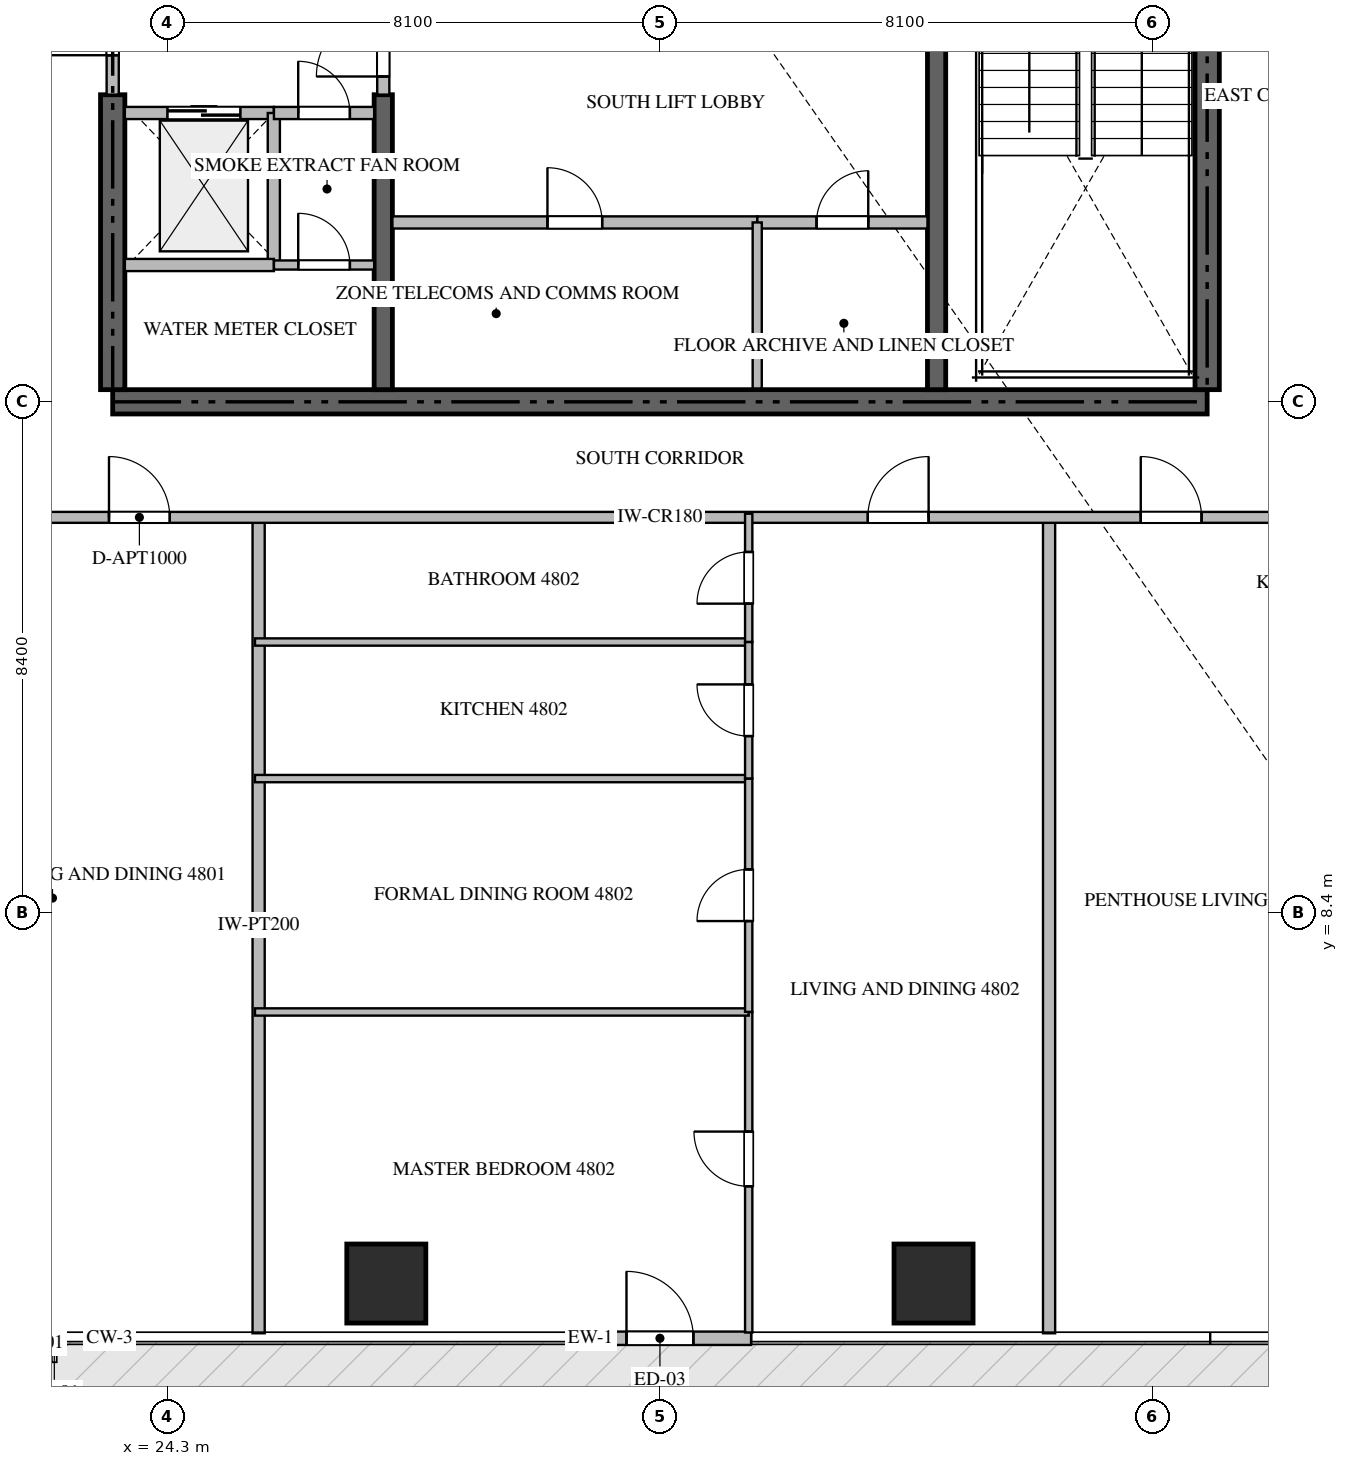
"""IFC4 building model, lengths in metres.
Left out: names, types, materials, properties, quantities, classifications, styles, units other than length and angle.
Written with IfcOpenShell. Run it as: python <this file> out.ifc"""

import sys

from ifc_helpers import new_model, si_unit, direction, frame, frame_2d, origin, origin_2d, place, context, subcontext, project, spatial, rectangle, extrude, source, transform, mapped, element, fill, save


model = new_model("IFC4")
c1 = context("Model", 3, precision=1e-05, world=origin(), true_north=direction((0.0, 1.0)))
c2 = subcontext(c1, "Body", "Model", "MODEL_VIEW")
j1 = project(units=[si_unit("LENGTHUNIT", "METRE"), si_unit("PLANEANGLEUNIT", "RADIAN")], contexts=[c1])
p1 = place(None, origin())
s1 = spatial("IfcSite", under=j1, at=p1, CompositionType="ELEMENT")
p2 = place(p1, origin())
s2 = spatial("IfcBuilding", under=s1, at=p2, CompositionType="ELEMENT")
p3 = place(p2, frame((0.0, 0.0, 191.4)))
s3 = spatial("IfcBuildingStorey", under=s2, at=p3, CompositionType="ELEMENT", Elevation=191.4)
p4 = place(p3, frame((23.4, 16.8, -0.26), z_axis=(0.0, 0.0, 1.0), x_axis=(1.0, 0.0, 0.0)))
e1 = element("IfcWall", 1, at=p4, inside=s3, PredefinedType="SHEAR", context=c2, shape_type="SweptSolid", body=[
    extrude(rectangle(XDim=18.0, YDim=0.4, at=frame_2d((9.0, 0.0))), origin(), (0.0, 0.0, 1.0), 3.748),
])
p5 = place(p3, frame((23.4, 17.0, -0.26), z_axis=(0.0, 0.0, 1.0), x_axis=(0.0, 1.0, 0.0)))
e2 = element("IfcWall", 2, at=p5, inside=s3, PredefinedType="SHEAR", context=c2, shape_type="SweptSolid", body=[
    extrude(rectangle(XDim=4.85, YDim=0.4, at=frame_2d((2.425, 0.0))), origin(), (0.0, 0.0, 1.0), 3.748),
])
p6 = place(p3, frame((41.4, 17.0, -0.26), z_axis=(0.0, 0.0, 1.0), x_axis=(0.0, 1.0, 0.0)))
e3 = element("IfcWall", 3, at=p6, inside=s3, PredefinedType="SHEAR", context=c2, shape_type="SweptSolid", body=[
    extrude(rectangle(XDim=8.35, YDim=0.4, at=frame_2d((4.175, 0.0))), origin(), (0.0, 0.0, 1.0), 3.748),
])
p7 = place(p3, frame((27.85, 17.0, -0.26), z_axis=(0.0, 0.0, 1.0), x_axis=(0.0, 1.0, 0.0)))
e4 = element("IfcWall", 4, at=p7, inside=s3, PredefinedType="SHEAR", context=c2, shape_type="SweptSolid", body=[
    extrude(rectangle(XDim=4.85, YDim=0.3, at=frame_2d((2.425, 0.0))), origin(), (0.0, 0.0, 1.0), 3.748),
])
p8 = place(p3, frame((36.95, 17.0, -0.26), z_axis=(0.0, 0.0, 1.0), x_axis=(0.0, 1.0, 0.0)))
e5 = element("IfcWall", 5, at=p8, inside=s3, PredefinedType="SHEAR", context=c2, shape_type="SweptSolid", body=[
    extrude(rectangle(XDim=8.35, YDim=0.3, at=frame_2d((4.175, 0.0))), origin(), (0.0, 0.0, 1.0), 3.748),
])
m1 = source(origin(), c2, "Body", "SweptSolid", [
    extrude(rectangle(XDim=1.3, YDim=1.3, at=origin_2d()), origin(), (0.0, 0.0, 1.0), 3.75),
])
for number, where, z_axis, x_axis in (
    (6, (27.9, 2.3, -0.26), (0.0, 0.0, 1.0), (1.0, 0.0, 0.0)),
    (7, (36.9, 2.3, -0.26), (0.0, 0.0, 1.0), (1.0, 0.0, 0.0)),
):
    element("IfcColumn", number, at=place(p3, frame(where, z_axis=z_axis, x_axis=x_axis)), inside=s3, PredefinedType="COLUMN", context=c2, shape_type="MappedRepresentation", body=[
        mapped(m1, transform((0.0, 0.0, 0.0), scale=1.0)),
    ])
p9 = place(p3, frame((30.9, 1.4, 0.0), z_axis=(0.0, 0.0, 1.0), x_axis=(1.0, 0.0, 0.0)))
e8 = element("IfcWall", 8, at=p9, inside=s3, PredefinedType="ELEMENTEDWALL", context=c2, shape_type="SweptSolid", body=[
    extrude(rectangle(XDim=3.0, YDim=0.22, at=frame_2d((1.5, 0.0))), origin(), (0.0, 0.0, 1.0), 3.475),
])
p10 = place(p9, frame((0.95, 0.0, 0.0)))
e9 = element("IfcOpeningElement", 9, at=p10, cuts=e8, PredefinedType="OPENING", context=c2, shape_type="SweptSolid", body=[
    extrude(rectangle(XDim=1.1, YDim=2.2, at=frame_2d((0.55, 1.1))), frame((0.0, 0.12, 0.0), z_axis=(0.0, -1.0, 0.0), x_axis=(1.0, 0.0, 0.0)), (0.0, 0.0, 1.0), 0.24),
])
p11 = place(p3, frame((23.6, 21.55, 0.0), z_axis=(0.0, 0.0, 1.0), x_axis=(1.0, 0.0, 0.0)))
e10 = element("IfcWall", 10, at=p11, inside=s3, PredefinedType="STANDARD", context=c2, shape_type="SweptSolid", body=[
    extrude(rectangle(XDim=2.45, YDim=0.2, at=frame_2d((1.225, 0.0))), origin(), (0.0, 0.0, 1.0), 3.49),
])
p12 = place(p11, frame((0.7, 0.0, 0.0)))
e11 = element("IfcOpeningElement", 11, at=p12, cuts=e10, PredefinedType="OPENING", context=c2, shape_type="SweptSolid", body=[
    extrude(rectangle(XDim=1.2, YDim=2.2, at=frame_2d((0.6, 1.1))), frame((0.0, 0.11, 0.0), z_axis=(0.0, -1.0, 0.0), x_axis=(1.0, 0.0, 0.0)), (0.0, 0.0, 1.0), 0.22),
])
p13 = place(p3, frame((26.05, 19.05, 0.0), z_axis=(0.0, 0.0, 1.0), x_axis=(0.0, 1.0, 0.0)))
e12 = element("IfcWall", 12, at=p13, inside=s3, PredefinedType="STANDARD", context=c2, shape_type="SweptSolid", body=[
    extrude(rectangle(XDim=2.5, YDim=0.2, at=frame_2d((1.25, 0.0))), origin(), (0.0, 0.0, 1.0), 3.49),
])
p14 = place(p3, frame((23.6, 19.05, 0.0), z_axis=(0.0, 0.0, 1.0), x_axis=(1.0, 0.0, 0.0)))
e13 = element("IfcWall", 13, at=p14, inside=s3, PredefinedType="STANDARD", context=c2, shape_type="SweptSolid", body=[
    extrude(rectangle(XDim=2.45, YDim=0.2, at=frame_2d((1.225, 0.0))), origin(), (0.0, 0.0, 1.0), 3.49),
])
p15 = place(p3, frame((26.052, 21.55, 0.0), z_axis=(0.0, 0.0, 1.0), x_axis=(1.0, 0.0, 0.0)))
e14 = element("IfcWall", 14, at=p15, inside=s3, PredefinedType="STANDARD", context=c2, shape_type="SweptSolid", body=[
    extrude(rectangle(XDim=1.648, YDim=0.2, at=frame_2d((0.824, 0.0))), origin(), (0.0, 0.0, 1.0), 3.49),
])
p16 = place(p15, frame((0.399, 0.0, 0.0)))
e15 = element("IfcOpeningElement", 15, at=p16, cuts=e14, PredefinedType="OPENING", context=c2, shape_type="SweptSolid", body=[
    extrude(rectangle(XDim=0.85, YDim=2.1, at=frame_2d((0.425, 1.05))), frame((0.0, 0.11, 0.0), z_axis=(0.0, -1.0, 0.0), x_axis=(1.0, 0.0, 0.0)), (0.0, 0.0, 1.0), 0.22),
])
p17 = place(p3, frame((23.4, 21.852, 0.0), z_axis=(0.0, 0.0, 1.0), x_axis=(0.0, 1.0, 0.0)))
e16 = element("IfcWall", 16, at=p17, inside=s3, PredefinedType="STANDARD", context=c2, shape_type="SweptSolid", body=[
    extrude(rectangle(XDim=2.396, YDim=0.2, at=frame_2d((1.198, 0.0))), origin(), (0.0, 0.0, 1.0), 3.49),
])
p18 = place(p17, frame((0.648, 0.0, 0.0)))
e17 = element("IfcOpeningElement", 17, at=p18, cuts=e16, PredefinedType="OPENING", context=c2, shape_type="SweptSolid", body=[
    extrude(rectangle(XDim=1.1, YDim=2.15, at=frame_2d((0.55, 1.075))), frame((0.0, 0.11, 0.0), z_axis=(0.0, -1.0, 0.0), x_axis=(1.0, 0.0, 0.0)), (0.0, 0.0, 1.0), 0.22),
])
p19 = place(p3, frame((27.85, 21.852, 0.0), z_axis=(0.0, 0.0, 1.0), x_axis=(0.0, 1.0, 0.0)))
e18 = element("IfcWall", 18, at=p19, inside=s3, PredefinedType="STANDARD", context=c2, shape_type="SweptSolid", body=[
    extrude(rectangle(XDim=1.696, YDim=0.2, at=frame_2d((0.848, 0.0))), origin(), (0.0, 0.0, 1.0), 3.49),
])
p20 = place(p19, frame((0.298, 0.0, 0.0)))
e19 = element("IfcOpeningElement", 19, at=p20, cuts=e18, PredefinedType="OPENING", context=c2, shape_type="SweptSolid", body=[
    extrude(rectangle(XDim=1.1, YDim=2.15, at=frame_2d((0.55, 1.075))), frame((0.0, 0.11, 0.0), z_axis=(0.0, -1.0, 0.0), x_axis=(1.0, 0.0, 0.0)), (0.0, 0.0, 1.0), 0.22),
])
p21 = place(p3, frame((26.052, 19.05, 0.0), z_axis=(0.0, 0.0, 1.0), x_axis=(1.0, 0.0, 0.0)))
e20 = element("IfcWall", 20, at=p21, inside=s3, PredefinedType="PARTITIONING", context=c2, shape_type="SweptSolid", body=[
    extrude(rectangle(XDim=1.648, YDim=0.15, at=frame_2d((0.824, 0.0))), origin(), (0.0, 0.0, 1.0), 3.49),
])
p22 = place(p21, frame((0.399, 0.0, 0.0)))
e21 = element("IfcOpeningElement", 21, at=p22, cuts=e20, PredefinedType="OPENING", context=c2, shape_type="SweptSolid", body=[
    extrude(rectangle(XDim=0.85, YDim=2.1, at=frame_2d((0.425, 1.05))), frame((0.0, 0.085, 0.0), z_axis=(0.0, -1.0, 0.0), x_axis=(1.0, 0.0, 0.0)), (0.0, 0.0, 1.0), 0.17),
])
p23 = place(p3, frame((28.0, 19.75, 0.0), z_axis=(0.0, 0.0, 1.0), x_axis=(1.0, 0.0, 0.0)))
e22 = element("IfcWall", 22, at=p23, inside=s3, PredefinedType="STANDARD", context=c2, shape_type="SweptSolid", body=[
    extrude(rectangle(XDim=6.0, YDim=0.2, at=frame_2d((3.0, 0.0))), origin(), (0.0, 0.0, 1.0), 3.49),
])
p24 = place(p23, frame((2.55, 0.0, 0.0)))
e23 = element("IfcOpeningElement", 23, at=p24, cuts=e22, PredefinedType="OPENING", context=c2, shape_type="SweptSolid", body=[
    extrude(rectangle(XDim=0.9, YDim=2.1, at=frame_2d((0.45, 1.05))), frame((0.0, 0.11, 0.0), z_axis=(0.0, -1.0, 0.0), x_axis=(1.0, 0.0, 0.0)), (0.0, 0.0, 1.0), 0.22),
])
p25 = place(p3, frame((34.002, 19.75, 0.0), z_axis=(0.0, 0.0, 1.0), x_axis=(1.0, 0.0, 0.0)))
e24 = element("IfcWall", 24, at=p25, inside=s3, PredefinedType="STANDARD", context=c2, shape_type="SweptSolid", body=[
    extrude(rectangle(XDim=2.798, YDim=0.2, at=frame_2d((1.399, 0.0))), origin(), (0.0, 0.0, 1.0), 3.49),
])
p26 = place(p25, frame((0.974, 0.0, 0.0)))
e25 = element("IfcOpeningElement", 25, at=p26, cuts=e24, PredefinedType="OPENING", context=c2, shape_type="SweptSolid", body=[
    extrude(rectangle(XDim=0.85, YDim=2.1, at=frame_2d((0.425, 1.05))), frame((0.0, 0.11, 0.0), z_axis=(0.0, -1.0, 0.0), x_axis=(1.0, 0.0, 0.0)), (0.0, 0.0, 1.0), 0.22),
])
p27 = place(p3, frame((34.0, 17.02, 0.0), z_axis=(0.0, 0.0, 1.0), x_axis=(0.0, 1.0, 0.0)))
e26 = element("IfcWall", 26, at=p27, inside=s3, PredefinedType="PARTITIONING", context=c2, shape_type="SweptSolid", body=[
    extrude(rectangle(XDim=2.73, YDim=0.15, at=frame_2d((1.365, 0.0))), origin(), (0.0, 0.0, 1.0), 3.49),
])
for number, where, z_axis, x_axis in (
    (27, (25.8, 1.482, 0.0), (0.0, 0.0, 1.0), (0.0, 1.0, 0.0)),
    (28, (38.8, 1.482, 0.0), (0.0, 0.0, 1.0), (0.0, 1.0, 0.0)),
):
    element("IfcWall", number, at=place(p3, frame(where, z_axis=z_axis, x_axis=x_axis)), inside=s3, PredefinedType="PARTITIONING", context=c2, shape_type="SweptSolid", body=[
        extrude(rectangle(XDim=13.418, YDim=0.2, at=frame_2d((6.709, 0.0))), origin(), (0.0, 0.0, 1.0), 3.49),
    ])
p28 = place(p3, frame((20.952, 14.9, 0.0), z_axis=(0.0, 0.0, 1.0), x_axis=(1.0, 0.0, 0.0)))
e29 = element("IfcWall", 29, at=p28, inside=s3, PredefinedType="PARTITIONING", context=c2, shape_type="SweptSolid", body=[
    extrude(rectangle(XDim=22.896, YDim=0.18, at=frame_2d((11.448, 0.0))), origin(), (0.0, 0.0, 1.0), 3.49),
])
p29 = place(p28, frame((2.387, 0.0, 0.0)))
e30 = element("IfcOpeningElement", 30, at=p29, cuts=e29, PredefinedType="OPENING", context=c2, shape_type="SweptSolid", body=[
    extrude(rectangle(XDim=1.0, YDim=2.15, at=frame_2d((0.5, 1.075))), frame((0.0, 0.1, 0.0), z_axis=(0.0, -1.0, 0.0), x_axis=(1.0, 0.0, 0.0)), (0.0, 0.0, 1.0), 0.2),
])
p30 = place(p28, frame((14.867, 0.0, 0.0)))
e31 = element("IfcOpeningElement", 31, at=p30, cuts=e29, PredefinedType="OPENING", context=c2, shape_type="SweptSolid", body=[
    extrude(rectangle(XDim=1.0, YDim=2.15, at=frame_2d((0.5, 1.075))), frame((0.0, 0.1, 0.0), z_axis=(0.0, -1.0, 0.0), x_axis=(1.0, 0.0, 0.0)), (0.0, 0.0, 1.0), 0.2),
])
p31 = place(p28, frame((19.356, 0.0, 0.0)))
e32 = element("IfcOpeningElement", 32, at=p31, cuts=e29, PredefinedType="OPENING", context=c2, shape_type="SweptSolid", body=[
    extrude(rectangle(XDim=1.0, YDim=2.15, at=frame_2d((0.5, 1.075))), frame((0.0, 0.1, 0.0), z_axis=(0.0, -1.0, 0.0), x_axis=(1.0, 0.0, 0.0)), (0.0, 0.0, 1.0), 0.2),
])
p32 = place(p3, frame((33.86, 1.495, 0.0), z_axis=(0.0, 0.0, 1.0), x_axis=(0.0, 1.0, 0.0)))
e33 = element("IfcWall", 33, at=p32, inside=s3, PredefinedType="PARTITIONING", context=c2, shape_type="SweptSolid", body=[
    extrude(rectangle(XDim=5.271, YDim=0.12, at=frame_2d((2.635, 0.0))), origin(), (0.0, 0.0, 1.0), 3.49),
])
p33 = place(p32, frame((2.404, 0.0, 0.0)))
e34 = element("IfcOpeningElement", 34, at=p33, cuts=e33, PredefinedType="OPENING", context=c2, shape_type="SweptSolid", body=[
    extrude(rectangle(XDim=0.9, YDim=2.1, at=frame_2d((0.45, 1.05))), frame((0.0, 0.07, 0.0), z_axis=(0.0, -1.0, 0.0), x_axis=(1.0, 0.0, 0.0)), (0.0, 0.0, 1.0), 0.14),
])
for number, where, z_axis, x_axis in (
    (35, (25.74, 6.766, 0.0), (0.0, 0.0, 1.0), (1.0, 0.0, 0.0)),
    (36, (25.74, 10.604, 0.0), (0.0, 0.0, 1.0), (1.0, 0.0, 0.0)),
    (37, (25.74, 12.85, 0.0), (0.0, 0.0, 1.0), (1.0, 0.0, 0.0)),
):
    element("IfcWall", number, at=place(p3, frame(where, z_axis=z_axis, x_axis=x_axis)), inside=s3, PredefinedType="PARTITIONING", context=c2, shape_type="SweptSolid", body=[
        extrude(rectangle(XDim=8.12, YDim=0.12, at=frame_2d((4.06, 0.0))), origin(), (0.0, 0.0, 1.0), 3.49),
    ])
p34 = place(p3, frame((33.86, 6.768, 0.0), z_axis=(0.0, 0.0, 1.0), x_axis=(0.0, 1.0, 0.0)))
e38 = element("IfcWall", 38, at=p34, inside=s3, PredefinedType="PARTITIONING", context=c2, shape_type="SweptSolid", body=[
    extrude(rectangle(XDim=3.836, YDim=0.12, at=frame_2d((1.918, 0.0))), origin(), (0.0, 0.0, 1.0), 3.49),
])
p35 = place(p34, frame((1.493, 0.0, 0.0)))
e39 = element("IfcOpeningElement", 39, at=p35, cuts=e38, PredefinedType="OPENING", context=c2, shape_type="SweptSolid", body=[
    extrude(rectangle(XDim=0.85, YDim=2.1, at=frame_2d((0.425, 1.05))), frame((0.0, 0.07, 0.0), z_axis=(0.0, -1.0, 0.0), x_axis=(1.0, 0.0, 0.0)), (0.0, 0.0, 1.0), 0.14),
])
p36 = place(p3, frame((33.86, 10.606, 0.0), z_axis=(0.0, 0.0, 1.0), x_axis=(0.0, 1.0, 0.0)))
e40 = element("IfcWall", 40, at=p36, inside=s3, PredefinedType="PARTITIONING", context=c2, shape_type="SweptSolid", body=[
    extrude(rectangle(XDim=2.244, YDim=0.12, at=frame_2d((1.122, 0.0))), origin(), (0.0, 0.0, 1.0), 3.49),
])
p37 = place(p36, frame((0.697, 0.0, 0.0)))
e41 = element("IfcOpeningElement", 41, at=p37, cuts=e40, PredefinedType="OPENING", context=c2, shape_type="SweptSolid", body=[
    extrude(rectangle(XDim=0.85, YDim=2.1, at=frame_2d((0.425, 1.05))), frame((0.0, 0.07, 0.0), z_axis=(0.0, -1.0, 0.0), x_axis=(1.0, 0.0, 0.0)), (0.0, 0.0, 1.0), 0.14),
])
p38 = place(p3, frame((33.86, 12.852, 0.0), z_axis=(0.0, 0.0, 1.0), x_axis=(0.0, 1.0, 0.0)))
e42 = element("IfcWall", 42, at=p38, inside=s3, PredefinedType="PARTITIONING", context=c2, shape_type="SweptSolid", body=[
    extrude(rectangle(XDim=2.108, YDim=0.12, at=frame_2d((1.054, 0.0))), origin(), (0.0, 0.0, 1.0), 3.49),
])
p39 = place(p38, frame((0.629, 0.0, 0.0)))
e43 = element("IfcOpeningElement", 43, at=p39, cuts=e42, PredefinedType="OPENING", context=c2, shape_type="SweptSolid", body=[
    extrude(rectangle(XDim=0.85, YDim=2.1, at=frame_2d((0.425, 1.05))), frame((0.0, 0.07, 0.0), z_axis=(0.0, -1.0, 0.0), x_axis=(1.0, 0.0, 0.0)), (0.0, 0.0, 1.0), 0.14),
])
m2 = source(origin(), c2, "Body", "SweptSolid", [
    extrude(rectangle(XDim=1.1, YDim=2.2, at=frame_2d((0.55, 1.1))), frame((0.0, 0.025, 0.0), z_axis=(0.0, -1.0, 0.0), x_axis=(1.0, 0.0, 0.0)), (0.0, 0.0, 1.0), 0.05),
])
p40 = place(p10, origin())
e44 = element("IfcDoor", 44, at=p40, inside=s3, OperationType="SINGLE_SWING_LEFT", PredefinedType="DOOR", context=c2, shape_type="MappedRepresentation", body=[
    mapped(m2, transform((0.0, 0.0, 0.0), scale=1.0)),
])
fill(e9, e44)
m3 = source(origin(), c2, "Body", "SweptSolid", [
    extrude(rectangle(XDim=1.2, YDim=2.2, at=frame_2d((0.6, 1.1))), frame((0.0, 0.025, 0.0), z_axis=(0.0, -1.0, 0.0), x_axis=(1.0, 0.0, 0.0)), (0.0, 0.0, 1.0), 0.05),
])
p41 = place(p12, origin())
e45 = element("IfcDoor", 45, at=p41, inside=s3, OperationType="DOUBLE_DOOR_SLIDING", PredefinedType="DOOR", context=c2, shape_type="MappedRepresentation", body=[
    mapped(m3, transform((0.0, 0.0, 0.0), scale=1.0)),
])
fill(e11, e45)
m4 = source(origin(), c2, "Body", "SweptSolid", [
    extrude(rectangle(XDim=0.85, YDim=2.1, at=frame_2d((0.425, 1.05))), frame((0.0, 0.025, 0.0), z_axis=(0.0, -1.0, 0.0), x_axis=(1.0, 0.0, 0.0)), (0.0, 0.0, 1.0), 0.05),
])
p42 = place(p16, origin())
e46 = element("IfcDoor", 46, at=p42, inside=s3, OperationType="SINGLE_SWING_LEFT", PredefinedType="DOOR", context=c2, shape_type="MappedRepresentation", body=[
    mapped(m4, transform((0.0, 0.0, 0.0), scale=1.0)),
])
fill(e15, e46)
m5 = source(origin(), c2, "Body", "SweptSolid", [
    extrude(rectangle(XDim=1.1, YDim=2.15, at=frame_2d((0.55, 1.075))), frame((0.0, 0.025, 0.0), z_axis=(0.0, -1.0, 0.0), x_axis=(1.0, 0.0, 0.0)), (0.0, 0.0, 1.0), 0.05),
])
p43 = place(p18, origin())
e47 = element("IfcDoor", 47, at=p43, inside=s3, OperationType="SINGLE_SWING_LEFT", PredefinedType="DOOR", context=c2, shape_type="MappedRepresentation", body=[
    mapped(m5, transform((0.0, 0.0, 0.0), scale=1.0)),
])
fill(e17, e47)
p44 = place(p20, origin())
e48 = element("IfcDoor", 48, at=p44, inside=s3, OperationType="SINGLE_SWING_LEFT", PredefinedType="DOOR", context=c2, shape_type="MappedRepresentation", body=[
    mapped(m5, transform((0.0, 0.0, 0.0), scale=1.0)),
])
fill(e19, e48)
p45 = place(p22, origin())
e49 = element("IfcDoor", 49, at=p45, inside=s3, OperationType="SINGLE_SWING_LEFT", PredefinedType="DOOR", context=c2, shape_type="MappedRepresentation", body=[
    mapped(m4, transform((0.0, 0.0, 0.0), scale=1.0)),
])
fill(e21, e49)
m6 = source(origin(), c2, "Body", "SweptSolid", [
    extrude(rectangle(XDim=0.9, YDim=2.1, at=frame_2d((0.45, 1.05))), frame((0.0, 0.025, 0.0), z_axis=(0.0, -1.0, 0.0), x_axis=(1.0, 0.0, 0.0)), (0.0, 0.0, 1.0), 0.05),
])
p46 = place(p24, origin())
e50 = element("IfcDoor", 50, at=p46, inside=s3, OperationType="SINGLE_SWING_LEFT", PredefinedType="DOOR", context=c2, shape_type="MappedRepresentation", body=[
    mapped(m6, transform((0.0, 0.0, 0.0), scale=1.0)),
])
fill(e23, e50)
p47 = place(p26, origin())
e51 = element("IfcDoor", 51, at=p47, inside=s3, OperationType="SINGLE_SWING_RIGHT", PredefinedType="DOOR", context=c2, shape_type="MappedRepresentation", body=[
    mapped(m4, transform((0.0, 0.0, 0.0), scale=1.0)),
])
fill(e25, e51)
m7 = source(origin(), c2, "Body", "SweptSolid", [
    extrude(rectangle(XDim=1.0, YDim=2.15, at=frame_2d((0.5, 1.075))), frame((0.0, 0.025, 0.0), z_axis=(0.0, -1.0, 0.0), x_axis=(1.0, 0.0, 0.0)), (0.0, 0.0, 1.0), 0.05),
])
p48 = place(p29, origin())
e52 = element("IfcDoor", 52, at=p48, inside=s3, OperationType="SINGLE_SWING_LEFT", PredefinedType="DOOR", context=c2, shape_type="MappedRepresentation", body=[
    mapped(m7, transform((0.0, 0.0, 0.0), scale=1.0)),
])
fill(e30, e52)
p49 = place(p30, origin())
e53 = element("IfcDoor", 53, at=p49, inside=s3, OperationType="SINGLE_SWING_RIGHT", PredefinedType="DOOR", context=c2, shape_type="MappedRepresentation", body=[
    mapped(m7, transform((0.0, 0.0, 0.0), scale=1.0)),
])
fill(e31, e53)
p50 = place(p31, origin())
e54 = element("IfcDoor", 54, at=p50, inside=s3, OperationType="SINGLE_SWING_LEFT", PredefinedType="DOOR", context=c2, shape_type="MappedRepresentation", body=[
    mapped(m7, transform((0.0, 0.0, 0.0), scale=1.0)),
])
fill(e32, e54)
p51 = place(p33, origin())
e55 = element("IfcDoor", 55, at=p51, inside=s3, OperationType="SINGLE_SWING_RIGHT", PredefinedType="DOOR", context=c2, shape_type="MappedRepresentation", body=[
    mapped(m6, transform((0.0, 0.0, 0.0), scale=1.0)),
])
fill(e34, e55)
p52 = place(p35, origin())
e56 = element("IfcDoor", 56, at=p52, inside=s3, OperationType="SINGLE_SWING_LEFT", PredefinedType="DOOR", context=c2, shape_type="MappedRepresentation", body=[
    mapped(m4, transform((0.0, 0.0, 0.0), scale=1.0)),
])
fill(e39, e56)
p53 = place(p37, origin())
e57 = element("IfcDoor", 57, at=p53, inside=s3, OperationType="SINGLE_SWING_RIGHT", PredefinedType="DOOR", context=c2, shape_type="MappedRepresentation", body=[
    mapped(m4, transform((0.0, 0.0, 0.0), scale=1.0)),
])
fill(e41, e57)
p54 = place(p39, origin())
e58 = element("IfcDoor", 58, at=p54, inside=s3, OperationType="SINGLE_SWING_LEFT", PredefinedType="DOOR", context=c2, shape_type="MappedRepresentation", body=[
    mapped(m4, transform((0.0, 0.0, 0.0), scale=1.0)),
])
fill(e43, e58)
save(model, sys.argv[1])
